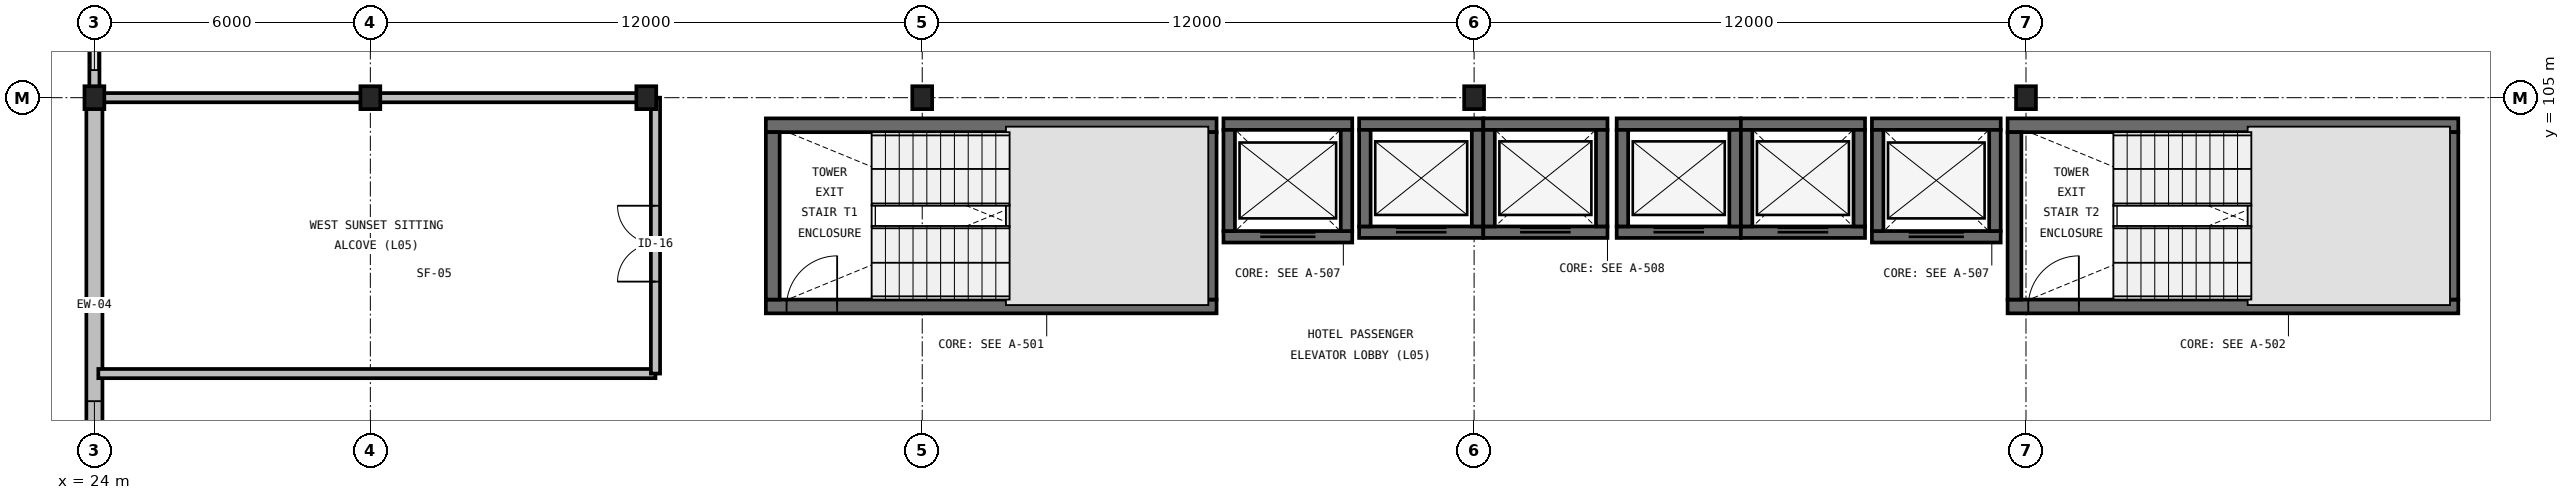
"""IFC4 building model, lengths in metres.
Left out: names, types, materials, properties, quantities, classifications, styles, units other than length and angle.
Written with IfcOpenShell. Run it as: python <this file> out.ifc"""

import sys

from ifc_helpers import new_model, si_unit, direction, frame, frame_2d, origin, origin_2d, place, context, subcontext, project, spatial, rectangle, i_section, extrude, element, fill, save


model = new_model("IFC4")
c1 = context("Model", 3, precision=1e-05, world=origin(), true_north=direction((0.0, 1.0)))
c2 = subcontext(c1, "Body", "Model", "MODEL_VIEW")
j1 = project(units=[si_unit("LENGTHUNIT", "METRE"), si_unit("PLANEANGLEUNIT", "RADIAN")], contexts=[c1])
p1 = place(None, origin())
s1 = spatial("IfcSite", under=j1, at=p1, CompositionType="ELEMENT")
p2 = place(p1, origin())
s2 = spatial("IfcBuilding", under=s1, at=p2, CompositionType="ELEMENT")
p3 = place(p2, frame((0.0, 0.0, 27.6)))
s3 = spatial("IfcBuildingStorey", under=s2, at=p3, CompositionType="ELEMENT", Elevation=27.6)
for number, where, z_axis, x_axis in (
    (1, (24.0, 105.0, 0.0), (0.0, 0.0, 1.0), (1.0, 0.0, 0.0)),
    (2, (30.0, 105.0, 0.0), (0.0, 0.0, 1.0), (1.0, 0.0, 0.0)),
    (3, (36.0, 105.0, 0.0), (0.0, 0.0, 1.0), (1.0, 0.0, 0.0)),
    (4, (42.0, 105.0, 0.0), (0.0, 0.0, 1.0), (1.0, 0.0, 0.0)),
    (5, (54.0, 105.0, 0.0), (0.0, 0.0, 1.0), (1.0, 0.0, 0.0)),
    (6, (66.0, 105.0, 0.0), (0.0, 0.0, 1.0), (1.0, 0.0, 0.0)),
):
    element("IfcColumn", number, at=place(p3, frame(where, z_axis=z_axis, x_axis=x_axis)), inside=s3, PredefinedType="COLUMN", context=c2, shape_type="SweptSolid", body=[
        extrude(i_section(OverallWidth=0.432, OverallDepth=0.498, WebThickness=0.056, FlangeThickness=0.089, FilletRadius=0.031, at=origin_2d()), origin(), (0.0, 0.0, 1.0), 3.6),
    ])
p4 = place(p3, frame((38.6, 100.46, 0.0), z_axis=(0.0, 0.0, 1.0), x_axis=(1.0, 0.0, 0.0)))
e7 = element("IfcWall", 7, at=p4, inside=s3, PredefinedType="SHEAR", context=c2, shape_type="SweptSolid", body=[
    extrude(rectangle(XDim=9.8, YDim=0.3, at=frame_2d((4.9, 0.0))), origin(), (0.0, 0.0, 1.0), 3.6),
])
p5 = place(p4, frame((0.45, 0.0, 0.0)))
e8 = element("IfcOpeningElement", 8, at=p5, cuts=e7, PredefinedType="OPENING", context=c2, shape_type="SweptSolid", body=[
    extrude(rectangle(XDim=1.1, YDim=2.2, at=frame_2d((0.55, 1.1))), frame((0.0, 0.165, 0.0), z_axis=(0.0, -1.0, 0.0), x_axis=(1.0, 0.0, 0.0)), (0.0, 0.0, 1.0), 0.33),
])
p6 = place(p3, frame((48.4, 104.4, 0.0), z_axis=(0.0, 0.0, 1.0), x_axis=(-1.0, 0.0, 0.0)))
e9 = element("IfcWall", 9, at=p6, inside=s3, PredefinedType="SHEAR", context=c2, shape_type="SweptSolid", body=[
    extrude(rectangle(XDim=9.8, YDim=0.3, at=frame_2d((4.9, 0.0))), origin(), (0.0, 0.0, 1.0), 3.6),
])
for number, where, z_axis, x_axis in (
    (10, (38.75, 104.25, 0.0), (0.0, 0.0, 1.0), (0.0, -1.0, 0.0)),
    (11, (48.25, 100.61, 0.0), (0.0, 0.0, 1.0), (0.0, 1.0, 0.0)),
):
    element("IfcWall", number, at=place(p3, frame(where, z_axis=z_axis, x_axis=x_axis)), inside=s3, PredefinedType="SHEAR", context=c2, shape_type="SweptSolid", body=[
        extrude(rectangle(XDim=3.64, YDim=0.3, at=frame_2d((1.82, 0.0))), origin(), (0.0, 0.0, 1.0), 3.6),
    ])
p7 = place(p3, frame((65.6, 100.46, 0.0), z_axis=(0.0, 0.0, 1.0), x_axis=(1.0, 0.0, 0.0)))
e12 = element("IfcWall", 12, at=p7, inside=s3, PredefinedType="SHEAR", context=c2, shape_type="SweptSolid", body=[
    extrude(rectangle(XDim=9.8, YDim=0.3, at=frame_2d((4.9, 0.0))), origin(), (0.0, 0.0, 1.0), 3.6),
])
p8 = place(p7, frame((0.45, 0.0, 0.0)))
e13 = element("IfcOpeningElement", 13, at=p8, cuts=e12, PredefinedType="OPENING", context=c2, shape_type="SweptSolid", body=[
    extrude(rectangle(XDim=1.1, YDim=2.2, at=frame_2d((0.55, 1.1))), frame((0.0, 0.165, 0.0), z_axis=(0.0, -1.0, 0.0), x_axis=(1.0, 0.0, 0.0)), (0.0, 0.0, 1.0), 0.33),
])
p9 = place(p3, frame((75.4, 104.4, 0.0), z_axis=(0.0, 0.0, 1.0), x_axis=(-1.0, 0.0, 0.0)))
e14 = element("IfcWall", 14, at=p9, inside=s3, PredefinedType="SHEAR", context=c2, shape_type="SweptSolid", body=[
    extrude(rectangle(XDim=9.8, YDim=0.3, at=frame_2d((4.9, 0.0))), origin(), (0.0, 0.0, 1.0), 3.6),
])
for number, where, z_axis, x_axis in (
    (15, (65.75, 104.25, 0.0), (0.0, 0.0, 1.0), (0.0, -1.0, 0.0)),
    (16, (75.25, 100.61, 0.0), (0.0, 0.0, 1.0), (0.0, 1.0, 0.0)),
):
    element("IfcWall", number, at=place(p3, frame(where, z_axis=z_axis, x_axis=x_axis)), inside=s3, PredefinedType="SHEAR", context=c2, shape_type="SweptSolid", body=[
        extrude(rectangle(XDim=3.64, YDim=0.3, at=frame_2d((1.82, 0.0))), origin(), (0.0, 0.0, 1.0), 3.6),
    ])
p10 = place(p3, frame((48.55, 101.975, 0.0), z_axis=(0.0, 0.0, 1.0), x_axis=(1.0, 0.0, 0.0)))
e17 = element("IfcWall", 17, at=p10, inside=s3, PredefinedType="SHEAR", context=c2, shape_type="SweptSolid", body=[
    extrude(rectangle(XDim=2.8, YDim=0.25, at=frame_2d((1.4, 0.0))), origin(), (0.0, 0.0, 1.0), 3.6),
])
p11 = place(p10, frame((0.8, 0.0, 0.0)))
e18 = element("IfcOpeningElement", 18, at=p11, cuts=e17, PredefinedType="OPENING", context=c2, shape_type="SweptSolid", body=[
    extrude(rectangle(XDim=1.2, YDim=2.2, at=frame_2d((0.6, 1.1))), frame((0.0, 0.14, 0.0), z_axis=(0.0, -1.0, 0.0), x_axis=(1.0, 0.0, 0.0)), (0.0, 0.0, 1.0), 0.28),
])
p12 = place(p3, frame((51.35, 104.425, 0.0), z_axis=(0.0, 0.0, 1.0), x_axis=(-1.0, 0.0, 0.0)))
e19 = element("IfcWall", 19, at=p12, inside=s3, PredefinedType="SHEAR", context=c2, shape_type="SweptSolid", body=[
    extrude(rectangle(XDim=2.8, YDim=0.25, at=frame_2d((1.4, 0.0))), origin(), (0.0, 0.0, 1.0), 3.6),
])
for number, where, z_axis, x_axis in (
    (20, (48.675, 104.3, 0.0), (0.0, 0.0, 1.0), (0.0, -1.0, 0.0)),
    (21, (51.225, 102.1, 0.0), (0.0, 0.0, 1.0), (0.0, 1.0, 0.0)),
):
    element("IfcWall", number, at=place(p3, frame(where, z_axis=z_axis, x_axis=x_axis)), inside=s3, PredefinedType="SHEAR", context=c2, shape_type="SweptSolid", body=[
        extrude(rectangle(XDim=2.2, YDim=0.25, at=frame_2d((1.1, 0.0))), origin(), (0.0, 0.0, 1.0), 3.6),
    ])
p13 = place(p3, frame((62.65, 101.975, 0.0), z_axis=(0.0, 0.0, 1.0), x_axis=(1.0, 0.0, 0.0)))
e22 = element("IfcWall", 22, at=p13, inside=s3, PredefinedType="SHEAR", context=c2, shape_type="SweptSolid", body=[
    extrude(rectangle(XDim=2.8, YDim=0.25, at=frame_2d((1.4, 0.0))), origin(), (0.0, 0.0, 1.0), 3.6),
])
p14 = place(p13, frame((0.8, 0.0, 0.0)))
e23 = element("IfcOpeningElement", 23, at=p14, cuts=e22, PredefinedType="OPENING", context=c2, shape_type="SweptSolid", body=[
    extrude(rectangle(XDim=1.2, YDim=2.2, at=frame_2d((0.6, 1.1))), frame((0.0, 0.14, 0.0), z_axis=(0.0, -1.0, 0.0), x_axis=(1.0, 0.0, 0.0)), (0.0, 0.0, 1.0), 0.28),
])
p15 = place(p3, frame((65.45, 104.425, 0.0), z_axis=(0.0, 0.0, 1.0), x_axis=(-1.0, 0.0, 0.0)))
e24 = element("IfcWall", 24, at=p15, inside=s3, PredefinedType="SHEAR", context=c2, shape_type="SweptSolid", body=[
    extrude(rectangle(XDim=2.8, YDim=0.25, at=frame_2d((1.4, 0.0))), origin(), (0.0, 0.0, 1.0), 3.6),
])
for number, where, z_axis, x_axis in (
    (25, (62.775, 104.3, 0.0), (0.0, 0.0, 1.0), (0.0, -1.0, 0.0)),
    (26, (65.325, 102.1, 0.0), (0.0, 0.0, 1.0), (0.0, 1.0, 0.0)),
):
    element("IfcWall", number, at=place(p3, frame(where, z_axis=z_axis, x_axis=x_axis)), inside=s3, PredefinedType="SHEAR", context=c2, shape_type="SweptSolid", body=[
        extrude(rectangle(XDim=2.2, YDim=0.25, at=frame_2d((1.1, 0.0))), origin(), (0.0, 0.0, 1.0), 3.6),
    ])
p16 = place(p3, frame((51.5, 102.075, 0.0), z_axis=(0.0, 0.0, 1.0), x_axis=(1.0, 0.0, 0.0)))
e27 = element("IfcWall", 27, at=p16, inside=s3, PredefinedType="SHEAR", context=c2, shape_type="SweptSolid", body=[
    extrude(rectangle(XDim=2.7, YDim=0.25, at=frame_2d((1.35, 0.0))), origin(), (0.0, 0.0, 1.0), 3.6),
])
p17 = place(p16, frame((0.8, 0.0, 0.0)))
e28 = element("IfcOpeningElement", 28, at=p17, cuts=e27, PredefinedType="OPENING", context=c2, shape_type="SweptSolid", body=[
    extrude(rectangle(XDim=1.1, YDim=2.2, at=frame_2d((0.55, 1.1))), frame((0.0, 0.14, 0.0), z_axis=(0.0, -1.0, 0.0), x_axis=(1.0, 0.0, 0.0)), (0.0, 0.0, 1.0), 0.28),
])
p18 = place(p3, frame((54.2, 104.425, 0.0), z_axis=(0.0, 0.0, 1.0), x_axis=(-1.0, 0.0, 0.0)))
e29 = element("IfcWall", 29, at=p18, inside=s3, PredefinedType="SHEAR", context=c2, shape_type="SweptSolid", body=[
    extrude(rectangle(XDim=2.7, YDim=0.25, at=frame_2d((1.35, 0.0))), origin(), (0.0, 0.0, 1.0), 3.6),
])
for number, where, z_axis, x_axis in (
    (30, (51.625, 104.3, 0.0), (0.0, 0.0, 1.0), (0.0, -1.0, 0.0)),
    (31, (54.075, 102.2, 0.0), (0.0, 0.0, 1.0), (0.0, 1.0, 0.0)),
):
    element("IfcWall", number, at=place(p3, frame(where, z_axis=z_axis, x_axis=x_axis)), inside=s3, PredefinedType="SHEAR", context=c2, shape_type="SweptSolid", body=[
        extrude(rectangle(XDim=2.1, YDim=0.25, at=frame_2d((1.05, 0.0))), origin(), (0.0, 0.0, 1.0), 3.6),
    ])
p19 = place(p3, frame((54.2, 102.075, 0.0), z_axis=(0.0, 0.0, 1.0), x_axis=(1.0, 0.0, 0.0)))
e32 = element("IfcWall", 32, at=p19, inside=s3, PredefinedType="SHEAR", context=c2, shape_type="SweptSolid", body=[
    extrude(rectangle(XDim=2.7, YDim=0.25, at=frame_2d((1.35, 0.0))), origin(), (0.0, 0.0, 1.0), 3.6),
])
p20 = place(p19, frame((0.8, 0.0, 0.0)))
e33 = element("IfcOpeningElement", 33, at=p20, cuts=e32, PredefinedType="OPENING", context=c2, shape_type="SweptSolid", body=[
    extrude(rectangle(XDim=1.1, YDim=2.2, at=frame_2d((0.55, 1.1))), frame((0.0, 0.14, 0.0), z_axis=(0.0, -1.0, 0.0), x_axis=(1.0, 0.0, 0.0)), (0.0, 0.0, 1.0), 0.28),
])
p21 = place(p3, frame((56.9, 104.425, 0.0), z_axis=(0.0, 0.0, 1.0), x_axis=(-1.0, 0.0, 0.0)))
e34 = element("IfcWall", 34, at=p21, inside=s3, PredefinedType="SHEAR", context=c2, shape_type="SweptSolid", body=[
    extrude(rectangle(XDim=2.7, YDim=0.25, at=frame_2d((1.35, 0.0))), origin(), (0.0, 0.0, 1.0), 3.6),
])
for number, where, z_axis, x_axis in (
    (35, (54.325, 104.3, 0.0), (0.0, 0.0, 1.0), (0.0, -1.0, 0.0)),
    (36, (56.775, 102.2, 0.0), (0.0, 0.0, 1.0), (0.0, 1.0, 0.0)),
):
    element("IfcWall", number, at=place(p3, frame(where, z_axis=z_axis, x_axis=x_axis)), inside=s3, PredefinedType="SHEAR", context=c2, shape_type="SweptSolid", body=[
        extrude(rectangle(XDim=2.1, YDim=0.25, at=frame_2d((1.05, 0.0))), origin(), (0.0, 0.0, 1.0), 3.6),
    ])
p22 = place(p3, frame((57.1, 102.075, 0.0), z_axis=(0.0, 0.0, 1.0), x_axis=(1.0, 0.0, 0.0)))
e37 = element("IfcWall", 37, at=p22, inside=s3, PredefinedType="SHEAR", context=c2, shape_type="SweptSolid", body=[
    extrude(rectangle(XDim=2.7, YDim=0.25, at=frame_2d((1.35, 0.0))), origin(), (0.0, 0.0, 1.0), 3.6),
])
p23 = place(p22, frame((0.8, 0.0, 0.0)))
e38 = element("IfcOpeningElement", 38, at=p23, cuts=e37, PredefinedType="OPENING", context=c2, shape_type="SweptSolid", body=[
    extrude(rectangle(XDim=1.1, YDim=2.2, at=frame_2d((0.55, 1.1))), frame((0.0, 0.14, 0.0), z_axis=(0.0, -1.0, 0.0), x_axis=(1.0, 0.0, 0.0)), (0.0, 0.0, 1.0), 0.28),
])
p24 = place(p3, frame((59.8, 104.425, 0.0), z_axis=(0.0, 0.0, 1.0), x_axis=(-1.0, 0.0, 0.0)))
e39 = element("IfcWall", 39, at=p24, inside=s3, PredefinedType="SHEAR", context=c2, shape_type="SweptSolid", body=[
    extrude(rectangle(XDim=2.7, YDim=0.25, at=frame_2d((1.35, 0.0))), origin(), (0.0, 0.0, 1.0), 3.6),
])
for number, where, z_axis, x_axis in (
    (40, (57.225, 104.3, 0.0), (0.0, 0.0, 1.0), (0.0, -1.0, 0.0)),
    (41, (59.675, 102.2, 0.0), (0.0, 0.0, 1.0), (0.0, 1.0, 0.0)),
):
    element("IfcWall", number, at=place(p3, frame(where, z_axis=z_axis, x_axis=x_axis)), inside=s3, PredefinedType="SHEAR", context=c2, shape_type="SweptSolid", body=[
        extrude(rectangle(XDim=2.1, YDim=0.25, at=frame_2d((1.05, 0.0))), origin(), (0.0, 0.0, 1.0), 3.6),
    ])
p25 = place(p3, frame((59.8, 102.075, 0.0), z_axis=(0.0, 0.0, 1.0), x_axis=(1.0, 0.0, 0.0)))
e42 = element("IfcWall", 42, at=p25, inside=s3, PredefinedType="SHEAR", context=c2, shape_type="SweptSolid", body=[
    extrude(rectangle(XDim=2.7, YDim=0.25, at=frame_2d((1.35, 0.0))), origin(), (0.0, 0.0, 1.0), 3.6),
])
p26 = place(p25, frame((0.8, 0.0, 0.0)))
e43 = element("IfcOpeningElement", 43, at=p26, cuts=e42, PredefinedType="OPENING", context=c2, shape_type="SweptSolid", body=[
    extrude(rectangle(XDim=1.1, YDim=2.2, at=frame_2d((0.55, 1.1))), frame((0.0, 0.14, 0.0), z_axis=(0.0, -1.0, 0.0), x_axis=(1.0, 0.0, 0.0)), (0.0, 0.0, 1.0), 0.28),
])
p27 = place(p3, frame((62.5, 104.425, 0.0), z_axis=(0.0, 0.0, 1.0), x_axis=(-1.0, 0.0, 0.0)))
e44 = element("IfcWall", 44, at=p27, inside=s3, PredefinedType="SHEAR", context=c2, shape_type="SweptSolid", body=[
    extrude(rectangle(XDim=2.7, YDim=0.25, at=frame_2d((1.35, 0.0))), origin(), (0.0, 0.0, 1.0), 3.6),
])
for number, where, z_axis, x_axis in (
    (45, (59.925, 104.3, 0.0), (0.0, 0.0, 1.0), (0.0, -1.0, 0.0)),
    (46, (62.375, 102.2, 0.0), (0.0, 0.0, 1.0), (0.0, 1.0, 0.0)),
):
    element("IfcWall", number, at=place(p3, frame(where, z_axis=z_axis, x_axis=x_axis)), inside=s3, PredefinedType="SHEAR", context=c2, shape_type="SweptSolid", body=[
        extrude(rectangle(XDim=2.1, YDim=0.25, at=frame_2d((1.05, 0.0))), origin(), (0.0, 0.0, 1.0), 3.6),
    ])
p28 = place(p3, frame((24.0, 105.0, 0.0), z_axis=(0.0, 0.0, 1.0), x_axis=(0.0, -1.0, 0.0)))
e47 = element("IfcWall", 47, at=p28, inside=s3, PredefinedType="STANDARD", context=c2, shape_type="SweptSolid", body=[
    extrude(rectangle(XDim=9.0, YDim=0.35, at=frame_2d((4.5, 0.0))), origin(), (0.0, 0.0, 1.0), 2.981),
])
p29 = place(p28, frame((6.6, 0.0, 0.85)))
e48 = element("IfcOpeningElement", 48, at=p29, cuts=e47, PredefinedType="OPENING", context=c2, shape_type="SweptSolid", body=[
    extrude(rectangle(XDim=1.8, YDim=1.5, at=frame_2d((0.9, 0.75))), frame((0.0, 0.19, 0.0), z_axis=(0.0, -1.0, 0.0), x_axis=(1.0, 0.0, 0.0)), (0.0, 0.0, 1.0), 0.38),
])
p30 = place(p3, frame((24.0, 117.0, 0.0), z_axis=(0.0, 0.0, 1.0), x_axis=(0.0, -1.0, 0.0)))
e49 = element("IfcWall", 49, at=p30, inside=s3, PredefinedType="PARAPET", context=c2, shape_type="SweptSolid", body=[
    extrude(rectangle(XDim=12.0, YDim=0.22, at=frame_2d((6.0, 0.0))), origin(), (0.0, 0.0, 1.0), 0.2),
])
p31 = place(p3, frame((24.085, 99.0, 0.0), z_axis=(0.0, 0.0, 1.0), x_axis=(1.0, 0.0, 0.0)))
e50 = element("IfcWall", 50, at=p31, inside=s3, PredefinedType="PARTITIONING", context=c2, shape_type="SweptSolid", body=[
    extrude(rectangle(XDim=12.115, YDim=0.2, at=frame_2d((6.057, 0.0))), origin(), (0.0, 0.0, 1.0), 3.29),
])
p32 = place(p3, frame((36.2, 99.0, 0.0), z_axis=(0.0, 0.0, 1.0), x_axis=(0.0, 1.0, 0.0)))
e51 = element("IfcWall", 51, at=p32, inside=s3, PredefinedType="PARTITIONING", context=c2, shape_type="SweptSolid", body=[
    extrude(rectangle(XDim=6.0, YDim=0.2, at=frame_2d((3.0, 0.0))), origin(), (0.0, 0.0, 1.0), 3.29),
])
p33 = place(p32, frame((2.0, 0.0, 0.0)))
e52 = element("IfcOpeningElement", 52, at=p33, cuts=e51, PredefinedType="OPENING", context=c2, shape_type="SweptSolid", body=[
    extrude(rectangle(XDim=1.65, YDim=2.25, at=frame_2d((0.825, 1.125))), frame((0.0, 0.115, 0.0), z_axis=(0.0, -1.0, 0.0), x_axis=(1.0, 0.0, 0.0)), (0.0, 0.0, 1.0), 0.23),
])
p34 = place(p3, frame((36.2, 105.0, 0.0), z_axis=(0.0, 0.0, 1.0), x_axis=(-1.0, 0.0, 0.0)))
e53 = element("IfcWall", 53, at=p34, inside=s3, PredefinedType="PARTITIONING", context=c2, shape_type="SweptSolid", body=[
    extrude(rectangle(XDim=12.115, YDim=0.2, at=frame_2d((6.057, 0.0))), origin(), (0.0, 0.0, 1.0), 2.736),
])
p35 = place(p5, origin())
e54 = element("IfcDoor", 54, at=p35, inside=s3, OperationType="SINGLE_SWING_RIGHT", PredefinedType="DOOR", context=c2, shape_type="SweptSolid", body=[
    extrude(rectangle(XDim=1.1, YDim=2.2, at=frame_2d((0.55, 1.1))), frame((0.0, 0.025, 0.0), z_axis=(0.0, -1.0, 0.0), x_axis=(1.0, 0.0, 0.0)), (0.0, 0.0, 1.0), 0.05),
])
fill(e8, e54)
p36 = place(p8, origin())
e55 = element("IfcDoor", 55, at=p36, inside=s3, OperationType="SINGLE_SWING_RIGHT", PredefinedType="DOOR", context=c2, shape_type="SweptSolid", body=[
    extrude(rectangle(XDim=1.1, YDim=2.2, at=frame_2d((0.55, 1.1))), frame((0.0, 0.025, 0.0), z_axis=(0.0, -1.0, 0.0), x_axis=(1.0, 0.0, 0.0)), (0.0, 0.0, 1.0), 0.05),
])
fill(e13, e55)
p37 = place(p11, origin())
e56 = element("IfcDoor", 56, at=p37, inside=s3, OperationType="DOUBLE_DOOR_SLIDING", PredefinedType="DOOR", context=c2, shape_type="SweptSolid", body=[
    extrude(rectangle(XDim=1.2, YDim=2.2, at=frame_2d((0.6, 1.1))), frame((0.0, 0.025, 0.0), z_axis=(0.0, -1.0, 0.0), x_axis=(1.0, 0.0, 0.0)), (0.0, 0.0, 1.0), 0.05),
])
fill(e18, e56)
p38 = place(p14, origin())
e57 = element("IfcDoor", 57, at=p38, inside=s3, OperationType="DOUBLE_DOOR_SLIDING", PredefinedType="DOOR", context=c2, shape_type="SweptSolid", body=[
    extrude(rectangle(XDim=1.2, YDim=2.2, at=frame_2d((0.6, 1.1))), frame((0.0, 0.025, 0.0), z_axis=(0.0, -1.0, 0.0), x_axis=(1.0, 0.0, 0.0)), (0.0, 0.0, 1.0), 0.05),
])
fill(e23, e57)
p39 = place(p17, origin())
e58 = element("IfcDoor", 58, at=p39, inside=s3, OperationType="DOUBLE_DOOR_SLIDING", PredefinedType="DOOR", context=c2, shape_type="SweptSolid", body=[
    extrude(rectangle(XDim=1.1, YDim=2.2, at=frame_2d((0.55, 1.1))), frame((0.0, 0.025, 0.0), z_axis=(0.0, -1.0, 0.0), x_axis=(1.0, 0.0, 0.0)), (0.0, 0.0, 1.0), 0.05),
])
fill(e28, e58)
p40 = place(p20, origin())
e59 = element("IfcDoor", 59, at=p40, inside=s3, OperationType="DOUBLE_DOOR_SLIDING", PredefinedType="DOOR", context=c2, shape_type="SweptSolid", body=[
    extrude(rectangle(XDim=1.1, YDim=2.2, at=frame_2d((0.55, 1.1))), frame((0.0, 0.025, 0.0), z_axis=(0.0, -1.0, 0.0), x_axis=(1.0, 0.0, 0.0)), (0.0, 0.0, 1.0), 0.05),
])
fill(e33, e59)
p41 = place(p23, origin())
e60 = element("IfcDoor", 60, at=p41, inside=s3, OperationType="DOUBLE_DOOR_SLIDING", PredefinedType="DOOR", context=c2, shape_type="SweptSolid", body=[
    extrude(rectangle(XDim=1.1, YDim=2.2, at=frame_2d((0.55, 1.1))), frame((0.0, 0.025, 0.0), z_axis=(0.0, -1.0, 0.0), x_axis=(1.0, 0.0, 0.0)), (0.0, 0.0, 1.0), 0.05),
])
fill(e38, e60)
p42 = place(p26, origin())
e61 = element("IfcDoor", 61, at=p42, inside=s3, OperationType="DOUBLE_DOOR_SLIDING", PredefinedType="DOOR", context=c2, shape_type="SweptSolid", body=[
    extrude(rectangle(XDim=1.1, YDim=2.2, at=frame_2d((0.55, 1.1))), frame((0.0, 0.025, 0.0), z_axis=(0.0, -1.0, 0.0), x_axis=(1.0, 0.0, 0.0)), (0.0, 0.0, 1.0), 0.05),
])
fill(e43, e61)
p43 = place(p29, origin())
e62 = element("IfcWindow", 62, at=p43, inside=s3, PartitioningType="SINGLE_PANEL", PredefinedType="WINDOW", context=c2, shape_type="SweptSolid", body=[
    extrude(rectangle(XDim=1.8, YDim=1.5, at=frame_2d((0.9, 0.75))), frame((0.0, 0.03, 0.0), z_axis=(0.0, -1.0, 0.0), x_axis=(1.0, 0.0, 0.0)), (0.0, 0.0, 1.0), 0.06),
])
fill(e48, e62)
p44 = place(p33, origin())
e63 = element("IfcDoor", 63, at=p44, inside=s3, OperationType="DOUBLE_DOOR_SINGLE_SWING", PredefinedType="DOOR", context=c2, shape_type="SweptSolid", body=[
    extrude(rectangle(XDim=1.65, YDim=2.25, at=frame_2d((0.825, 1.125))), frame((0.0, 0.025, 0.0), z_axis=(0.0, -1.0, 0.0), x_axis=(1.0, 0.0, 0.0)), (0.0, 0.0, 1.0), 0.05),
])
fill(e52, e63)
save(model, sys.argv[1])
